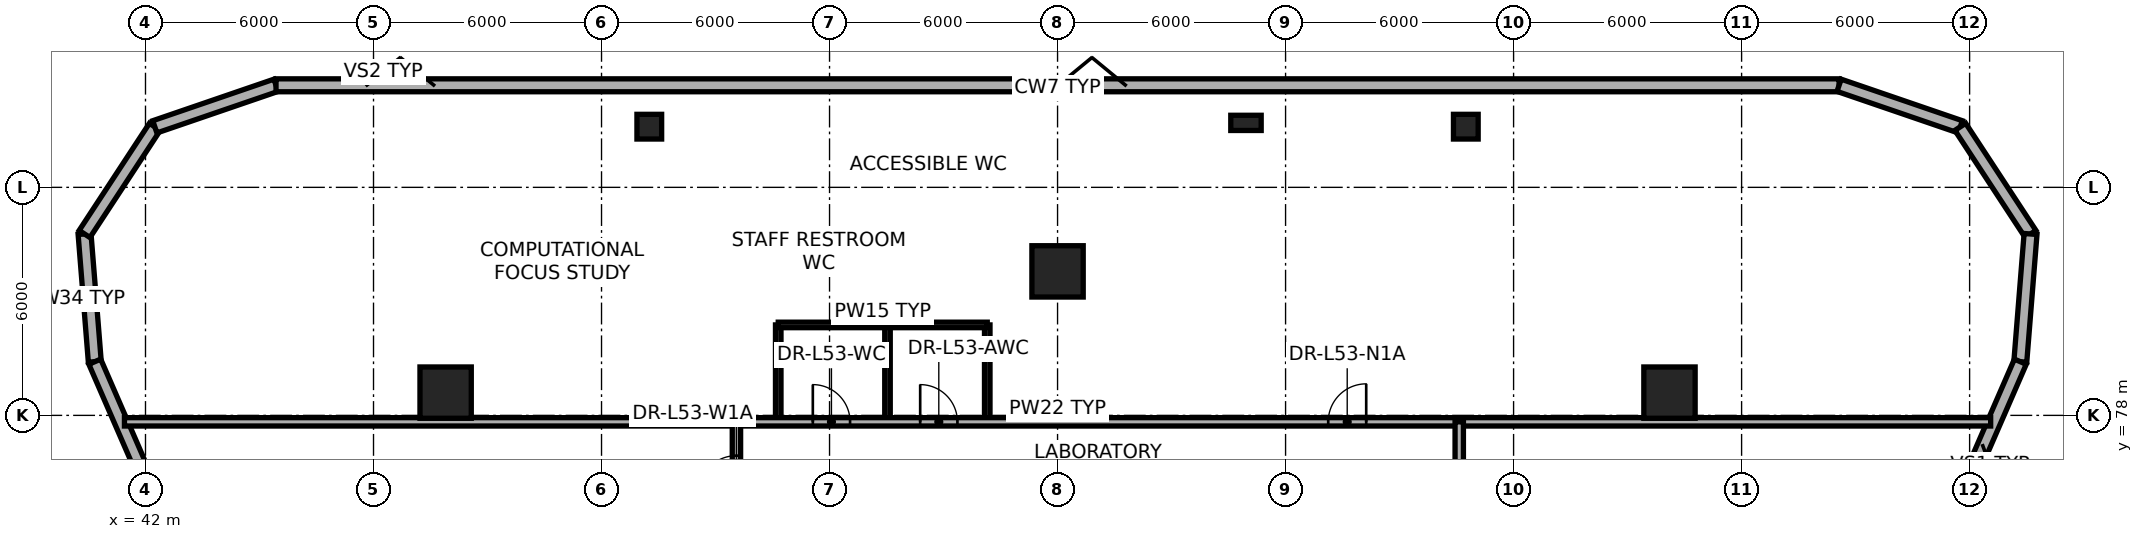
"""IFC4 building model, lengths in metres.
Left out: names, types, materials, properties, quantities, classifications, styles, units other than length and angle.
Written with IfcOpenShell. Run it as: python <this file> out.ifc"""

import sys

from ifc_helpers import new_model, si_unit, direction, frame, frame_2d, origin, origin_2d, place, context, subcontext, project, spatial, rectangle, extrude, element, fill, save


model = new_model("IFC4")
c1 = context("Model", 3, precision=1e-05, world=origin(), true_north=direction((0.0, 1.0)))
c2 = subcontext(c1, "Body", "Model", "MODEL_VIEW")
j1 = project(units=[si_unit("LENGTHUNIT", "METRE"), si_unit("PLANEANGLEUNIT", "RADIAN")], contexts=[c1])
p1 = place(None, origin())
s1 = spatial("IfcSite", under=j1, at=p1, CompositionType="ELEMENT")
p2 = place(p1, origin())
s2 = spatial("IfcBuilding", under=s1, at=p2, CompositionType="ELEMENT")
p3 = place(p2, frame((0.0, 0.0, 201.3)))
s3 = spatial("IfcBuildingStorey", under=s2, at=p3, CompositionType="ELEMENT", Elevation=201.3)
for number, where, z_axis, x_axis in (
    (1, (82.102, 78.599, 0.0), (0.0, 0.0, 1.0), (1.0, 0.0, 0.0)),
    (2, (49.898, 78.599, 0.0), (0.0, 0.0, 1.0), (1.0, 0.0, 0.0)),
    (3, (66.0, 81.789, 0.0), (0.0, 0.0, 1.0), (1.0, 0.0, 0.0)),
):
    element("IfcColumn", number, at=place(p3, frame(where, z_axis=z_axis, x_axis=x_axis)), inside=s3, PredefinedType="COLUMN", context=c2, shape_type="SweptSolid", body=[
        extrude(rectangle(XDim=1.35, YDim=1.35, at=origin_2d()), origin(), (0.0, 0.0, 1.0), 3.65),
    ])
p4 = place(p3, frame((76.792, 85.657, 0.003), z_axis=(-0.026841076243, -0.033534611465, 0.999077067328), x_axis=(-0.780716755404, 0.624885067698, 0.0)))
e4 = element("IfcColumn", 4, at=p4, inside=s3, PredefinedType="COLUMN", context=c2, shape_type="SweptSolid", body=[
    extrude(rectangle(XDim=0.65, YDim=0.65, at=origin_2d()), origin(), (0.0, 0.0, 1.0), 3.647),
])
p5 = place(p3, frame((70.981, 85.758, 0.003), z_axis=(-0.01238655289, -0.033544124313, 0.999360478022), x_axis=(-0.9380871136, 0.346399433166, 0.0)))
e5 = element("IfcColumn", 5, at=p5, inside=s3, PredefinedType="PILASTER", context=c2, shape_type="SweptSolid", body=[
    extrude(rectangle(XDim=0.8, YDim=0.4, at=origin_2d()), origin(), (0.0, 0.0, 1.0), 3.646),
])
p6 = place(p3, frame((55.208, 85.657, 0.003), z_axis=(0.026841076243, -0.033534611465, 0.999077067328), x_axis=(-0.780716755404, -0.624885067698, 0.0)))
e6 = element("IfcColumn", 6, at=p6, inside=s3, PredefinedType="COLUMN", context=c2, shape_type="SweptSolid", body=[
    extrude(rectangle(XDim=0.65, YDim=0.65, at=origin_2d()), origin(), (0.0, 0.0, 1.0), 3.647),
])
p7 = place(p3, frame((40.666, 79.412, 0.0), z_axis=(0.0, 0.0, 1.0), x_axis=(-0.079802786794, 0.996810671702, 0.0)))
e7 = element("IfcWall", 7, at=p7, inside=s3, PredefinedType="STANDARD", context=c2, shape_type="SweptSolid", body=[
    extrude(rectangle(XDim=3.371, YDim=0.34, at=frame_2d((1.686, 0.0))), origin(), (0.0, 0.0, 1.0), 3.4),
])
p8 = place(p3, frame((40.396, 82.773, 0.0), z_axis=(0.0, 0.0, 1.0), x_axis=(0.548384356693, 0.836226403155, 0.0)))
e8 = element("IfcWall", 8, at=p8, inside=s3, PredefinedType="STANDARD", context=c2, shape_type="SweptSolid", body=[
    extrude(rectangle(XDim=3.372, YDim=0.34, at=frame_2d((1.686, 0.0))), origin(), (0.0, 0.0, 1.0), 3.4),
])
p9 = place(p3, frame((42.245, 85.592, 0.0), z_axis=(0.0, 0.0, 1.0), x_axis=(0.945984660403, 0.324211385182, 0.0)))
e9 = element("IfcWall", 9, at=p9, inside=s3, PredefinedType="STANDARD", context=c2, shape_type="SweptSolid", body=[
    extrude(rectangle(XDim=3.371, YDim=0.34, at=frame_2d((1.686, 0.0))), origin(), (0.0, 0.0, 1.0), 3.4),
])
p10 = place(p3, frame((45.435, 86.685, 0.0), z_axis=(0.0, 0.0, 1.0), x_axis=(1.0, 0.0, 0.0)))
e10 = element("IfcWall", 10, at=p10, inside=s3, PredefinedType="STANDARD", context=c2, shape_type="SweptSolid", body=[
    extrude(rectangle(XDim=41.131, YDim=0.34, at=frame_2d((20.565, 0.0))), origin(), (0.0, 0.0, 1.0), 0.85),
])
p11 = place(p3, frame((86.565, 86.685, 0.0), z_axis=(0.0, 0.0, 1.0), x_axis=(0.945984660403, -0.324211385182, 0.0)))
e11 = element("IfcWall", 11, at=p11, inside=s3, PredefinedType="STANDARD", context=c2, shape_type="SweptSolid", body=[
    extrude(rectangle(XDim=3.371, YDim=0.34, at=frame_2d((1.686, 0.0))), origin(), (0.0, 0.0, 1.0), 3.4),
])
p12 = place(p3, frame((89.755, 85.592, 0.0), z_axis=(0.0, 0.0, 1.0), x_axis=(0.548384356693, -0.836226403155, 0.0)))
e12 = element("IfcWall", 12, at=p12, inside=s3, PredefinedType="STANDARD", context=c2, shape_type="SweptSolid", body=[
    extrude(rectangle(XDim=3.372, YDim=0.34, at=frame_2d((1.686, 0.0))), origin(), (0.0, 0.0, 1.0), 3.4),
])
p13 = place(p3, frame((91.604, 82.773, 0.0), z_axis=(0.0, 0.0, 1.0), x_axis=(-0.079802786794, -0.996810671702, 0.0)))
e13 = element("IfcWall", 13, at=p13, inside=s3, PredefinedType="STANDARD", context=c2, shape_type="SweptSolid", body=[
    extrude(rectangle(XDim=3.371, YDim=0.34, at=frame_2d((1.686, 0.0))), origin(), (0.0, 0.0, 1.0), 3.4),
])
p14 = place(p3, frame((91.334, 79.412, 0.0), z_axis=(0.0, 0.0, 1.0), x_axis=(-0.398629672145, -0.917111980341, 0.0)))
e14 = element("IfcWall", 14, at=p14, inside=s3, PredefinedType="STANDARD", context=c2, shape_type="SweptSolid", body=[
    extrude(rectangle(XDim=19.995, YDim=0.34, at=frame_2d((9.998, 0.0))), origin(), (0.0, 0.0, 1.0), 0.85),
])
p15 = place(p3, frame((61.231, 32.098, 0.0), z_axis=(0.0, 0.0, 1.0), x_axis=(-0.398627130257, 0.917113085188, 0.0)))
e15 = element("IfcWall", 15, at=p15, inside=s3, PredefinedType="STANDARD", context=c2, shape_type="SweptSolid", body=[
    extrude(rectangle(XDim=51.591, YDim=0.34, at=frame_2d((25.795, 0.0))), origin(), (0.0, 0.0, 1.0), 0.85),
])
p16 = place(p3, frame((58.65, 77.83, 0.0), z_axis=(0.0, 0.0, 1.0), x_axis=(0.0, 1.0, 0.0)))
e16 = element("IfcWall", 16, at=p16, inside=s3, PredefinedType="PARTITIONING", context=c2, shape_type="SweptSolid", body=[
    extrude(rectangle(XDim=2.55, YDim=0.145, at=frame_2d((1.275, 0.0))), origin(), (0.0, 0.0, 1.0), 2.78),
])
for number, where, z_axis, x_axis in (
    (17, (61.525, 77.83, 0.0), (0.0, 0.0, 1.0), (0.0, 1.0, 0.0)),
    (18, (64.15, 77.83, 0.0), (0.0, 0.0, 1.0), (0.0, 1.0, 0.0)),
):
    element("IfcWall", number, at=place(p3, frame(where, z_axis=z_axis, x_axis=x_axis)), inside=s3, PredefinedType="PARTITIONING", context=c2, shape_type="SweptSolid", body=[
        extrude(rectangle(XDim=2.55, YDim=0.145, at=frame_2d((1.275, 0.0))), origin(), (0.0, 0.0, 1.0), 3.4),
    ])
p17 = place(p3, frame((58.65, 80.38, 0.0), z_axis=(0.0, 0.0, 1.0), x_axis=(1.0, 0.0, 0.0)))
e19 = element("IfcWall", 19, at=p17, inside=s3, PredefinedType="PARTITIONING", context=c2, shape_type="SweptSolid", body=[
    extrude(rectangle(XDim=5.5, YDim=0.145, at=frame_2d((2.75, 0.0))), origin(), (0.0, 0.0, 1.0), 2.78),
])
p18 = place(p3, frame((41.446, 77.83, 0.0), z_axis=(0.0, 0.0, 1.0), x_axis=(1.0, 0.0, 0.0)))
e20 = element("IfcWall", 20, at=p18, inside=s3, PredefinedType="PARTITIONING", context=c2, shape_type="SweptSolid", body=[
    extrude(rectangle(XDim=49.108, YDim=0.22, at=frame_2d((24.554, 0.0))), origin(), (0.0, 0.0, 1.0), 2.6),
])
p19 = place(p18, frame((18.114, 0.0, 0.0)))
e21 = element("IfcOpeningElement", 21, at=p19, cuts=e20, PredefinedType="OPENING", context=c2, shape_type="SweptSolid", body=[
    extrude(rectangle(XDim=0.98, YDim=2.1, at=frame_2d((0.49, 1.05))), frame((0.0, 0.12, 0.0), z_axis=(0.0, -1.0, 0.0), x_axis=(1.0, 0.0, 0.0)), (0.0, 0.0, 1.0), 0.24),
])
p20 = place(p18, frame((20.939, 0.0, 0.0)))
e22 = element("IfcOpeningElement", 22, at=p20, cuts=e20, PredefinedType="OPENING", context=c2, shape_type="SweptSolid", body=[
    extrude(rectangle(XDim=0.98, YDim=2.1, at=frame_2d((0.49, 1.05))), frame((0.0, 0.12, 0.0), z_axis=(0.0, -1.0, 0.0), x_axis=(1.0, 0.0, 0.0)), (0.0, 0.0, 1.0), 0.24),
])
p21 = place(p18, frame((31.676, 0.0, 0.0)))
e23 = element("IfcOpeningElement", 23, at=p21, cuts=e20, PredefinedType="OPENING", context=c2, shape_type="SweptSolid", body=[
    extrude(rectangle(XDim=1.0, YDim=2.1, at=frame_2d((0.5, 1.05))), frame((0.0, 0.12, 0.0), z_axis=(0.0, -1.0, 0.0), x_axis=(1.0, 0.0, 0.0)), (0.0, 0.0, 1.0), 0.24),
])
p22 = place(p3, frame((57.55, 75.05, 0.0), z_axis=(0.0, 0.0, 1.0), x_axis=(0.0, 1.0, 0.0)))
e24 = element("IfcWall", 24, at=p22, inside=s3, PredefinedType="PARTITIONING", context=c2, shape_type="SweptSolid", body=[
    extrude(rectangle(XDim=2.78, YDim=0.22, at=frame_2d((1.39, 0.0))), origin(), (0.0, 0.0, 1.0), 2.78),
])
p23 = place(p22, frame((0.89, 0.0, 0.0)))
e25 = element("IfcOpeningElement", 25, at=p23, cuts=e24, PredefinedType="OPENING", context=c2, shape_type="SweptSolid", body=[
    extrude(rectangle(XDim=1.0, YDim=2.1, at=frame_2d((0.5, 1.05))), frame((0.0, 0.12, 0.0), z_axis=(0.0, -1.0, 0.0), x_axis=(1.0, 0.0, 0.0)), (0.0, 0.0, 1.0), 0.24),
])
p24 = place(p3, frame((76.57, 59.53, 0.0), z_axis=(0.0, 0.0, 1.0), x_axis=(0.0, 1.0, 0.0)))
e26 = element("IfcWall", 26, at=p24, inside=s3, PredefinedType="PARTITIONING", context=c2, shape_type="SweptSolid", body=[
    extrude(rectangle(XDim=18.3, YDim=0.22, at=frame_2d((9.15, 0.0))), origin(), (0.0, 0.0, 1.0), 2.78),
])
p25 = place(p24, frame((2.525, 0.0, 0.0)))
e27 = element("IfcOpeningElement", 27, at=p25, cuts=e26, PredefinedType="OPENING", context=c2, shape_type="SweptSolid", body=[
    extrude(rectangle(XDim=1.05, YDim=2.15, at=frame_2d((0.525, 1.075))), frame((0.0, 0.12, 0.0), z_axis=(0.0, -1.0, 0.0), x_axis=(1.0, 0.0, 0.0)), (0.0, 0.0, 1.0), 0.24),
])
p26 = place(p24, frame((8.625, 0.0, 0.0)))
e28 = element("IfcOpeningElement", 28, at=p26, cuts=e26, PredefinedType="OPENING", context=c2, shape_type="SweptSolid", body=[
    extrude(rectangle(XDim=1.05, YDim=2.15, at=frame_2d((0.525, 1.075))), frame((0.0, 0.12, 0.0), z_axis=(0.0, -1.0, 0.0), x_axis=(1.0, 0.0, 0.0)), (0.0, 0.0, 1.0), 0.24),
])
p27 = place(p24, frame((14.725, 0.0, 0.0)))
e29 = element("IfcOpeningElement", 29, at=p27, cuts=e26, PredefinedType="OPENING", context=c2, shape_type="SweptSolid", body=[
    extrude(rectangle(XDim=1.05, YDim=2.15, at=frame_2d((0.525, 1.075))), frame((0.0, 0.12, 0.0), z_axis=(0.0, -1.0, 0.0), x_axis=(1.0, 0.0, 0.0)), (0.0, 0.0, 1.0), 0.24),
])
p28 = place(p19, origin())
e30 = element("IfcDoor", 30, at=p28, inside=s3, OperationType="SINGLE_SWING_LEFT", PredefinedType="DOOR", context=c2, shape_type="SweptSolid", body=[
    extrude(rectangle(XDim=0.98, YDim=2.1, at=frame_2d((0.49, 1.05))), frame((0.0, 0.025, 0.0), z_axis=(0.0, -1.0, 0.0), x_axis=(1.0, 0.0, 0.0)), (0.0, 0.0, 1.0), 0.05),
])
fill(e21, e30)
p29 = place(p20, origin())
e31 = element("IfcDoor", 31, at=p29, inside=s3, OperationType="SINGLE_SWING_LEFT", PredefinedType="DOOR", context=c2, shape_type="SweptSolid", body=[
    extrude(rectangle(XDim=0.98, YDim=2.1, at=frame_2d((0.49, 1.05))), frame((0.0, 0.025, 0.0), z_axis=(0.0, -1.0, 0.0), x_axis=(1.0, 0.0, 0.0)), (0.0, 0.0, 1.0), 0.05),
])
fill(e22, e31)
p30 = place(p21, origin())
e32 = element("IfcDoor", 32, at=p30, inside=s3, OperationType="SINGLE_SWING_RIGHT", PredefinedType="DOOR", context=c2, shape_type="SweptSolid", body=[
    extrude(rectangle(XDim=1.0, YDim=2.1, at=frame_2d((0.5, 1.05))), frame((0.0, 0.025, 0.0), z_axis=(0.0, -1.0, 0.0), x_axis=(1.0, 0.0, 0.0)), (0.0, 0.0, 1.0), 0.05),
])
fill(e23, e32)
p31 = place(p23, origin())
e33 = element("IfcDoor", 33, at=p31, inside=s3, OperationType="SINGLE_SWING_LEFT", PredefinedType="DOOR", context=c2, shape_type="SweptSolid", body=[
    extrude(rectangle(XDim=1.0, YDim=2.1, at=frame_2d((0.5, 1.05))), frame((0.0, 0.025, 0.0), z_axis=(0.0, -1.0, 0.0), x_axis=(1.0, 0.0, 0.0)), (0.0, 0.0, 1.0), 0.05),
])
fill(e25, e33)
save(model, sys.argv[1])
